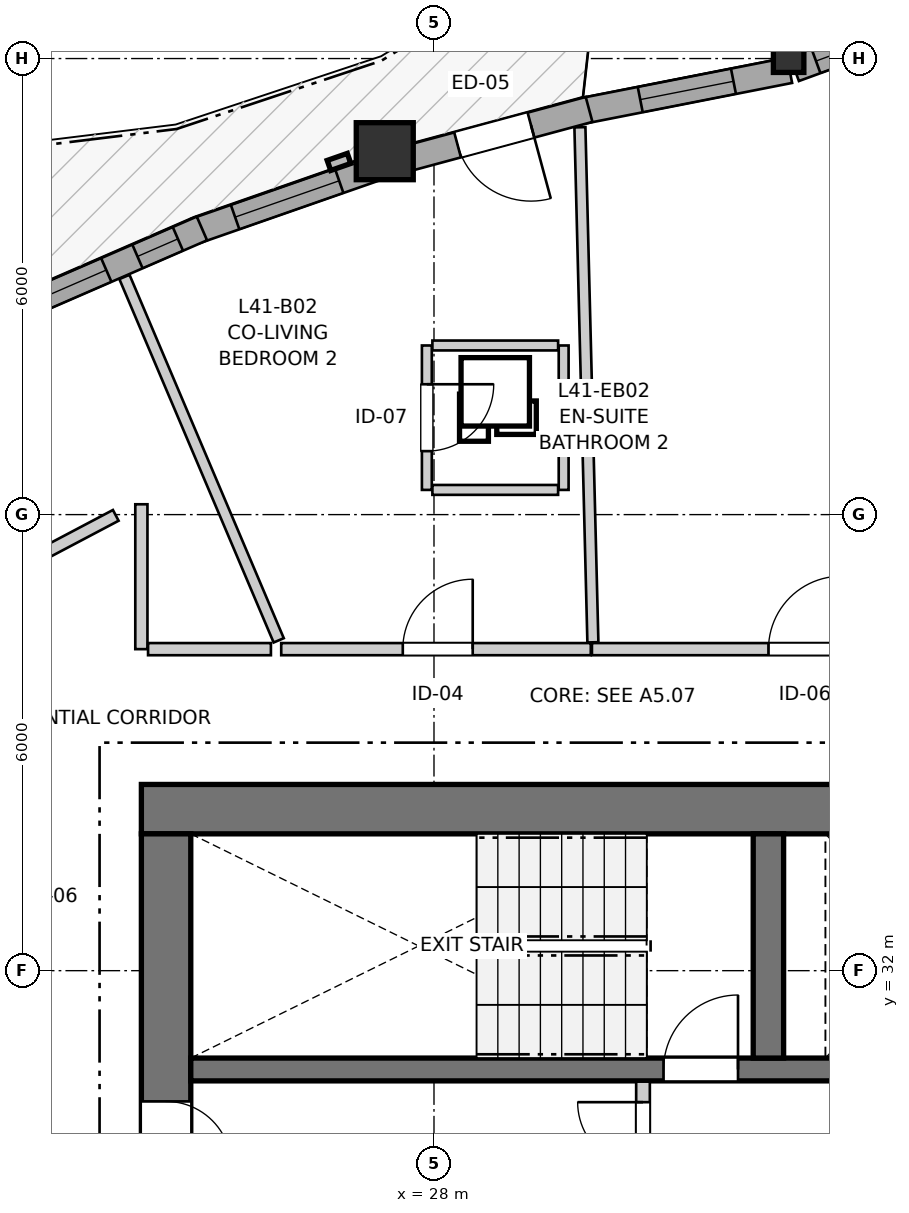
"""IFC4 building model, lengths in metres.
Left out: names, types, materials, properties, quantities, classifications, styles, units other than length and angle.
Written with IfcOpenShell. Run it as: python <this file> out.ifc"""

import sys

from ifc_helpers import new_model, si_unit, direction, frame, frame_2d, origin, origin_2d, place, context, subcontext, project, spatial, rectangle, i_section, extrude, source, transform, mapped, element, fill, save


model = new_model("IFC4")
c1 = context("Model", 3, precision=1e-05, world=origin(), true_north=direction((0.0, 1.0)))
c2 = subcontext(c1, "Body", "Model", "MODEL_VIEW")
j1 = project(units=[si_unit("LENGTHUNIT", "METRE"), si_unit("PLANEANGLEUNIT", "RADIAN")], contexts=[c1])
p1 = place(None, origin())
s1 = spatial("IfcSite", under=j1, at=p1, CompositionType="ELEMENT")
p2 = place(p1, origin())
s2 = spatial("IfcBuilding", under=s1, at=p2, CompositionType="ELEMENT")
p3 = place(p2, frame((0.0, 0.0, 139.4)))
s3 = spatial("IfcBuildingStorey", under=s2, at=p3, CompositionType="ELEMENT", Elevation=139.4)
p4 = place(p3, frame((36.55, 34.125, 0.0), z_axis=(0.0, 0.0, 1.0), x_axis=(-1.0, 0.0, 0.0)))
e1 = element("IfcWall", 1, at=p4, inside=s3, PredefinedType="SHEAR", context=c2, shape_type="SweptSolid", body=[
    extrude(rectangle(XDim=12.4, YDim=0.65, at=frame_2d((6.2, 0.0))), origin(), (0.0, 0.0, 1.0), 2.95),
])
p5 = place(p3, frame((24.475, 33.8, 0.0), z_axis=(0.0, 0.0, 1.0), x_axis=(0.0, -1.0, 0.0)))
e2 = element("IfcWall", 2, at=p5, inside=s3, PredefinedType="SHEAR", context=c2, shape_type="SweptSolid", body=[
    extrude(rectangle(XDim=15.6, YDim=0.65, at=frame_2d((7.8, 0.0))), origin(), (0.0, 0.0, 1.0), 2.95),
])
p6 = place(p5, frame((7.05, 0.0, 0.0)))
e3 = element("IfcOpeningElement", 3, at=p6, cuts=e2, PredefinedType="OPENING", context=c2, shape_type="SweptSolid", body=[
    extrude(rectangle(XDim=1.5, YDim=2.15, at=frame_2d((0.75, 1.075))), frame((0.0, 0.335, 0.0), z_axis=(0.0, -1.0, 0.0), x_axis=(1.0, 0.0, 0.0)), (0.0, 0.0, 1.0), 0.67),
])
p7 = place(p5, frame((3.52, 0.0, 0.0)))
e4 = element("IfcOpeningElement", 4, at=p7, cuts=e2, PredefinedType="OPENING", context=c2, shape_type="SweptSolid", body=[
    extrude(rectangle(XDim=0.86, YDim=2.05, at=frame_2d((0.43, 1.025))), frame((0.0, 0.335, 0.0), z_axis=(0.0, -1.0, 0.0), x_axis=(1.0, 0.0, 0.0)), (0.0, 0.0, 1.0), 0.67),
])
p8 = place(p5, frame((11.22, 0.0, 0.0)))
e5 = element("IfcOpeningElement", 5, at=p8, cuts=e2, PredefinedType="OPENING", context=c2, shape_type="SweptSolid", body=[
    extrude(rectangle(XDim=0.86, YDim=2.05, at=frame_2d((0.43, 1.025))), frame((0.0, 0.335, 0.0), z_axis=(0.0, -1.0, 0.0), x_axis=(1.0, 0.0, 0.0)), (0.0, 0.0, 1.0), 0.67),
])
p9 = place(p3, frame((24.8, 30.7, 0.0), z_axis=(0.0, 0.0, 1.0), x_axis=(1.0, 0.0, 0.0)))
e6 = element("IfcWall", 6, at=p9, inside=s3, PredefinedType="SHEAR", context=c2, shape_type="SweptSolid", body=[
    extrude(rectangle(XDim=11.1, YDim=0.3, at=frame_2d((5.55, 0.0))), origin(), (0.0, 0.0, 1.0), 2.95),
])
p10 = place(p9, frame((6.22, 0.0, 0.0)))
e7 = element("IfcOpeningElement", 7, at=p10, cuts=e6, PredefinedType="OPENING", context=c2, shape_type="SweptSolid", body=[
    extrude(rectangle(XDim=0.98, YDim=2.15, at=frame_2d((0.49, 1.075))), frame((0.0, 0.16, 0.0), z_axis=(0.0, -1.0, 0.0), x_axis=(1.0, 0.0, 0.0)), (0.0, 0.0, 1.0), 0.32),
])
p11 = place(p9, frame((9.15, 0.0, 0.0)))
e8 = element("IfcOpeningElement", 8, at=p11, cuts=e6, PredefinedType="OPENING", context=c2, shape_type="SweptSolid", body=[
    extrude(rectangle(XDim=1.15, YDim=2.15, at=frame_2d((0.575, 1.075))), frame((0.0, 0.16, 0.0), z_axis=(0.0, -1.0, 0.0), x_axis=(1.0, 0.0, 0.0)), (0.0, 0.0, 1.0), 0.32),
])
p12 = place(p3, frame((32.4, 30.85, 0.0), z_axis=(0.0, 0.0, 1.0), x_axis=(0.0, 1.0, 0.0)))
e9 = element("IfcWall", 9, at=p12, inside=s3, PredefinedType="SHEAR", context=c2, shape_type="SweptSolid", body=[
    extrude(rectangle(XDim=2.95, YDim=0.4, at=frame_2d((1.475, 0.0))), origin(), (0.0, 0.0, 1.0), 2.95),
])
m1 = source(origin(), c2, "Body", "SweptSolid", [
    extrude(i_section(OverallWidth=0.401, OverallDepth=0.399, WebThickness=0.023, FlangeThickness=0.036, FilletRadius=0.015, at=origin_2d()), origin(), (0.0, 0.0, 1.0), 2.95),
])
p13 = place(p3, frame((32.666, 44.017, 0.0), z_axis=(0.0, 0.0, 1.0), x_axis=(1.0, 0.0, 0.0)))
e10 = element("IfcColumn", 10, at=p13, inside=s3, PredefinedType="PILASTER", context=c2, shape_type="MappedRepresentation", body=[
    mapped(m1, transform((0.0, 0.0, 0.0), x_axis=(1.0, 0.0, 0.0), y_axis=(0.0, 1.0, 0.0), z_axis=(0.0, 0.0, 1.0), scale=1.0)),
])
m2 = source(origin(), c2, "Body", "SweptSolid", [
    extrude(rectangle(XDim=0.75, YDim=0.75, at=origin_2d()), origin(), (0.0, 0.0, 1.0), 2.95),
])
p14 = place(p3, frame((27.352, 42.781, 0.0), z_axis=(0.0, 0.0, 1.0), x_axis=(1.0, 0.0, 0.0)))
e11 = element("IfcColumn", 11, at=p14, inside=s3, PredefinedType="COLUMN", context=c2, shape_type="MappedRepresentation", body=[
    mapped(m2, transform((0.0, 0.0, 0.0), x_axis=(1.0, 0.0, 0.0), y_axis=(0.0, 1.0, 0.0), z_axis=(0.0, 0.0, 1.0), scale=1.0)),
])
p15 = place(p3, frame((34.644, 44.557, 0.0), z_axis=(0.0, 0.0, 1.0), x_axis=(-0.939440593615, -0.342711790092, 0.0)))
e12 = element("IfcWall", 12, at=p15, inside=s3, PredefinedType="SOLIDWALL", context=c2, shape_type="SweptSolid", body=[
    extrude(rectangle(XDim=2.023, YDim=0.34, at=frame_2d((1.012, 0.0))), origin(), (0.0, 0.0, 1.0), 2.53),
])
p16 = place(p15, frame((0.322, 0.0, 0.82)))
e13 = element("IfcOpeningElement", 13, at=p16, cuts=e12, PredefinedType="OPENING", context=c2, shape_type="SweptSolid", body=[
    extrude(rectangle(XDim=1.4, YDim=1.35, at=frame_2d((0.7, 0.675))), frame((0.0, 0.18, 0.0), z_axis=(0.0, -1.0, 0.0), x_axis=(1.0, 0.0, 0.0)), (0.0, 0.0, 1.0), 0.36),
])
p17 = place(p3, frame((32.679, 43.846, 0.0), z_axis=(0.0, 0.0, 1.0), x_axis=(-0.981247929568, -0.192749839736, 0.0)))
e14 = element("IfcWall", 14, at=p17, inside=s3, PredefinedType="SOLIDWALL", context=c2, shape_type="SweptSolid", body=[
    extrude(rectangle(XDim=2.776, YDim=0.34, at=frame_2d((1.388, 0.0))), origin(), (0.0, 0.0, 1.0), 2.53),
])
p18 = place(p17, frame((0.753, 0.0, 0.82)))
e15 = element("IfcOpeningElement", 15, at=p18, cuts=e14, PredefinedType="OPENING", context=c2, shape_type="SweptSolid", body=[
    extrude(rectangle(XDim=1.25, YDim=1.35, at=frame_2d((0.625, 0.675))), frame((0.0, 0.18, 0.0), z_axis=(0.0, -1.0, 0.0), x_axis=(1.0, 0.0, 0.0)), (0.0, 0.0, 1.0), 0.36),
])
p19 = place(p3, frame((30.04, 43.331, 0.0), z_axis=(0.0, 0.0, 1.0), x_axis=(-0.965460468502, -0.260549580233, 0.0)))
e16 = element("IfcWall", 16, at=p19, inside=s3, PredefinedType="SOLIDWALL", context=c2, shape_type="SweptSolid", body=[
    extrude(rectangle(XDim=2.583, YDim=0.34, at=frame_2d((1.292, 0.0))), origin(), (0.0, 0.0, 1.0), 2.53),
])
p20 = place(p19, frame((0.792, 0.0, 0.0)))
e17 = element("IfcOpeningElement", 17, at=p20, cuts=e16, PredefinedType="OPENING", context=c2, shape_type="SweptSolid", body=[
    extrude(rectangle(XDim=1.0, YDim=2.1, at=frame_2d((0.5, 1.05))), frame((0.0, 0.18, 0.0), z_axis=(0.0, -1.0, 0.0), x_axis=(1.0, 0.0, 0.0)), (0.0, 0.0, 1.0), 0.36),
])
p21 = place(p3, frame((27.262, 42.57, 0.0), z_axis=(0.0, 0.0, 1.0), x_axis=(-0.944148723561, -0.329519631884, 0.0)))
e18 = element("IfcWall", 18, at=p21, inside=s3, PredefinedType="SOLIDWALL", context=c2, shape_type="SweptSolid", body=[
    extrude(rectangle(XDim=2.54, YDim=0.34, at=frame_2d((1.27, 0.0))), origin(), (0.0, 0.0, 1.0), 2.53),
])
p22 = place(p21, frame((0.54, 0.0, 0.82)))
e19 = element("IfcOpeningElement", 19, at=p22, cuts=e18, PredefinedType="OPENING", context=c2, shape_type="SweptSolid", body=[
    extrude(rectangle(XDim=1.45, YDim=1.25, at=frame_2d((0.725, 0.625))), frame((0.0, 0.18, 0.0), z_axis=(0.0, -1.0, 0.0), x_axis=(1.0, 0.0, 0.0)), (0.0, 0.0, 1.0), 0.36),
])
p23 = place(p3, frame((24.947, 41.765, 0.0), z_axis=(0.0, 0.0, 1.0), x_axis=(-0.917074459221, -0.398715984435, 0.0)))
e20 = element("IfcWall", 20, at=p23, inside=s3, PredefinedType="SOLIDWALL", context=c2, shape_type="SweptSolid", body=[
    extrude(rectangle(XDim=2.645, YDim=0.34, at=frame_2d((1.322, 0.0))), origin(), (0.0, 0.0, 1.0), 2.53),
])
p24 = place(p23, frame((0.344, 0.0, 0.82)))
e21 = element("IfcOpeningElement", 21, at=p24, cuts=e20, PredefinedType="OPENING", context=c2, shape_type="SweptSolid", body=[
    extrude(rectangle(XDim=0.58, YDim=1.35, at=frame_2d((0.29, 0.675))), frame((0.0, 0.18, 0.0), z_axis=(0.0, -1.0, 0.0), x_axis=(1.0, 0.0, 0.0)), (0.0, 0.0, 1.0), 0.36),
])
p25 = place(p23, frame((1.372, 0.0, 0.82)))
e22 = element("IfcOpeningElement", 22, at=p25, cuts=e20, PredefinedType="OPENING", context=c2, shape_type="SweptSolid", body=[
    extrude(rectangle(XDim=0.95, YDim=1.35, at=frame_2d((0.475, 0.675))), frame((0.0, 0.18, 0.0), z_axis=(0.0, -1.0, 0.0), x_axis=(1.0, 0.0, 0.0)), (0.0, 0.0, 1.0), 0.36),
])
p26 = place(p3, frame((30.75, 27.43, 0.0), z_axis=(0.0, 0.0, 1.0), x_axis=(0.0, 1.0, 0.0)))
e23 = element("IfcWall", 23, at=p26, inside=s3, PredefinedType="PARTITIONING", context=c2, shape_type="SweptSolid", body=[
    extrude(rectangle(XDim=3.11, YDim=0.18, at=frame_2d((1.555, 0.0))), origin(), (0.0, 0.0, 1.0), 2.95),
])
p27 = place(p26, frame((1.98, 0.0, 0.0)))
e24 = element("IfcOpeningElement", 24, at=p27, cuts=e23, PredefinedType="OPENING", context=c2, shape_type="SweptSolid", body=[
    extrude(rectangle(XDim=0.86, YDim=2.05, at=frame_2d((0.43, 1.025))), frame((0.0, 0.1, 0.0), z_axis=(0.0, -1.0, 0.0), x_axis=(1.0, 0.0, 0.0)), (0.0, 0.0, 1.0), 0.2),
])
p28 = place(p3, frame((30.078, 36.23, 0.0), z_axis=(0.0, 0.0, 1.0), x_axis=(1.0, 0.0, 0.0)))
e25 = element("IfcWall", 25, at=p28, inside=s3, PredefinedType="PARTITIONING", context=c2, shape_type="SweptSolid", body=[
    extrude(rectangle(XDim=5.608, YDim=0.16, at=frame_2d((2.804, 0.0))), origin(), (0.0, 0.0, 1.0), 2.588),
])
p29 = place(p28, frame((2.323, 0.0, 0.0)))
e26 = element("IfcOpeningElement", 26, at=p29, cuts=e25, PredefinedType="OPENING", context=c2, shape_type="SweptSolid", body=[
    extrude(rectangle(XDim=0.96, YDim=2.1, at=frame_2d((0.48, 1.05))), frame((0.0, 0.09, 0.0), z_axis=(0.0, -1.0, 0.0), x_axis=(1.0, 0.0, 0.0)), (0.0, 0.0, 1.0), 0.18),
])
p30 = place(p3, frame((25.99, 36.23, 0.0), z_axis=(0.0, 0.0, 1.0), x_axis=(1.0, 0.0, 0.0)))
e27 = element("IfcWall", 27, at=p30, inside=s3, PredefinedType="PARTITIONING", context=c2, shape_type="SweptSolid", body=[
    extrude(rectangle(XDim=4.073, YDim=0.16, at=frame_2d((2.037, 0.0))), origin(), (0.0, 0.0, 1.0), 2.95),
])
p31 = place(p30, frame((1.6, 0.0, 0.0)))
e28 = element("IfcOpeningElement", 28, at=p31, cuts=e27, PredefinedType="OPENING", context=c2, shape_type="SweptSolid", body=[
    extrude(rectangle(XDim=0.92, YDim=2.1, at=frame_2d((0.46, 1.05))), frame((0.0, 0.09, 0.0), z_axis=(0.0, -1.0, 0.0), x_axis=(1.0, 0.0, 0.0)), (0.0, 0.0, 1.0), 0.18),
])
p32 = place(p3, frame((27.906, 40.225, 0.0), z_axis=(0.0, 0.0, 1.0), x_axis=(0.0, -1.0, 0.0)))
e29 = element("IfcWall", 29, at=p32, inside=s3, PredefinedType="PARTITIONING", context=c2, shape_type="SweptSolid", body=[
    extrude(rectangle(XDim=1.9, YDim=0.13, at=frame_2d((0.95, 0.0))), origin(), (0.0, 0.0, 1.0), 2.318),
])
p33 = place(p32, frame((0.51, 0.0, 0.0)))
e30 = element("IfcOpeningElement", 30, at=p33, cuts=e29, PredefinedType="OPENING", context=c2, shape_type="SweptSolid", body=[
    extrude(rectangle(XDim=0.88, YDim=2.05, at=frame_2d((0.44, 1.025))), frame((0.0, 0.075, 0.0), z_axis=(0.0, -1.0, 0.0), x_axis=(1.0, 0.0, 0.0)), (0.0, 0.0, 1.0), 0.15),
])
p34 = place(p3, frame((29.92, 43.096, 0.0), z_axis=(0.0, 0.0, 1.0), x_axis=(0.025211755772, -0.999682133166, 0.0)))
e31 = element("IfcWall", 31, at=p34, inside=s3, PredefinedType="PARTITIONING", context=c2, shape_type="SweptSolid", body=[
    extrude(rectangle(XDim=6.779, YDim=0.145, at=frame_2d((3.389, 0.0))), origin(), (0.0, 0.0, 1.0), 2.95),
])
p35 = place(p3, frame((23.927, 41.127, 0.0), z_axis=(0.0, 0.0, 1.0), x_axis=(0.39073452171, -0.920503413108, 0.0)))
e32 = element("IfcWall", 32, at=p35, inside=s3, PredefinedType="PARTITIONING", context=c2, shape_type="SweptSolid", body=[
    extrude(rectangle(XDim=5.194, YDim=0.145, at=frame_2d((2.597, 0.0))), origin(), (0.0, 0.0, 1.0), 2.95),
])
p36 = place(p3, frame((24.15, 36.23, 0.0), z_axis=(0.0, 0.0, 1.0), x_axis=(0.0, 1.0, 0.0)))
e33 = element("IfcWall", 33, at=p36, inside=s3, PredefinedType="PARTITIONING", context=c2, shape_type="SweptSolid", body=[
    extrude(rectangle(XDim=1.906, YDim=0.16, at=frame_2d((0.953, 0.0))), origin(), (0.0, 0.0, 1.0), 2.95),
])
p37 = place(p3, frame((29.706, 38.325, 0.0), z_axis=(0.0, 0.0, 1.0), x_axis=(0.0, 1.0, 0.0)))
e34 = element("IfcWall", 34, at=p37, inside=s3, PredefinedType="PARTITIONING", context=c2, shape_type="SweptSolid", body=[
    extrude(rectangle(XDim=1.9, YDim=0.13, at=frame_2d((0.95, 0.0))), origin(), (0.0, 0.0, 1.0), 2.95),
])
p38 = place(p3, frame((24.238, 36.23, 0.0), z_axis=(0.0, 0.0, 1.0), x_axis=(1.0, 0.0, 0.0)))
e35 = element("IfcWall", 35, at=p38, inside=s3, PredefinedType="PARTITIONING", context=c2, shape_type="SweptSolid", body=[
    extrude(rectangle(XDim=1.616, YDim=0.16, at=frame_2d((0.808, 0.0))), origin(), (0.0, 0.0, 1.0), 2.95),
])
p39 = place(p3, frame((27.979, 40.225, 0.0), z_axis=(0.0, 0.0, 1.0), x_axis=(1.0, 0.0, 0.0)))
e36 = element("IfcWall", 36, at=p39, inside=s3, PredefinedType="PARTITIONING", context=c2, shape_type="SweptSolid", body=[
    extrude(rectangle(XDim=1.654, YDim=0.13, at=frame_2d((0.827, 0.0))), origin(), (0.0, 0.0, 1.0), 2.558),
])
p40 = place(p3, frame((27.979, 38.325, 0.0), z_axis=(0.0, 0.0, 1.0), x_axis=(1.0, 0.0, 0.0)))
e37 = element("IfcWall", 37, at=p40, inside=s3, PredefinedType="PARTITIONING", context=c2, shape_type="SweptSolid", body=[
    extrude(rectangle(XDim=1.654, YDim=0.13, at=frame_2d((0.827, 0.0))), origin(), (0.0, 0.0, 1.0), 2.95),
])
p41 = place(p3, frame((22.37, 37.228, 0.0), z_axis=(0.0, 0.0, 1.0), x_axis=(0.884271493782, 0.466973152638, 0.0)))
e38 = element("IfcWall", 38, at=p41, inside=s3, PredefinedType="PARTITIONING", context=c2, shape_type="SweptSolid", body=[
    extrude(rectangle(XDim=1.632, YDim=0.16, at=frame_2d((0.816, 0.0))), origin(), (0.0, 0.0, 1.0), 2.558),
])
m3 = source(origin(), c2, "Body", "SweptSolid", [
    extrude(rectangle(XDim=1.4, YDim=1.35, at=frame_2d((0.7, 0.675))), frame((0.0, 0.03, 0.0), z_axis=(0.0, -1.0, 0.0), x_axis=(1.0, 0.0, 0.0)), (0.0, 0.0, 1.0), 0.06),
])
p42 = place(p16, origin())
e39 = element("IfcWindow", 39, at=p42, inside=s3, PartitioningType="SINGLE_PANEL", PredefinedType="WINDOW", context=c2, shape_type="MappedRepresentation", body=[
    mapped(m3, transform((0.0, 0.0, 0.0), x_axis=(1.0, 0.0, 0.0), y_axis=(0.0, 1.0, 0.0), z_axis=(0.0, 0.0, 1.0), scale=1.0)),
])
fill(e13, e39)
m4 = source(origin(), c2, "Body", "SweptSolid", [
    extrude(rectangle(XDim=1.25, YDim=1.35, at=frame_2d((0.625, 0.675))), frame((0.0, 0.03, 0.0), z_axis=(0.0, -1.0, 0.0), x_axis=(1.0, 0.0, 0.0)), (0.0, 0.0, 1.0), 0.06),
])
p43 = place(p18, origin())
e40 = element("IfcWindow", 40, at=p43, inside=s3, PartitioningType="SINGLE_PANEL", PredefinedType="WINDOW", context=c2, shape_type="MappedRepresentation", body=[
    mapped(m4, transform((0.0, 0.0, 0.0), x_axis=(1.0, 0.0, 0.0), y_axis=(0.0, 1.0, 0.0), z_axis=(0.0, 0.0, 1.0), scale=1.0)),
])
fill(e15, e40)
m5 = source(origin(), c2, "Body", "SweptSolid", [
    extrude(rectangle(XDim=1.45, YDim=1.25, at=frame_2d((0.725, 0.625))), frame((0.0, 0.03, 0.0), z_axis=(0.0, -1.0, 0.0), x_axis=(1.0, 0.0, 0.0)), (0.0, 0.0, 1.0), 0.06),
])
p44 = place(p22, origin())
e41 = element("IfcWindow", 41, at=p44, inside=s3, PartitioningType="SINGLE_PANEL", PredefinedType="WINDOW", context=c2, shape_type="MappedRepresentation", body=[
    mapped(m5, transform((0.0, 0.0, 0.0), x_axis=(1.0, 0.0, 0.0), y_axis=(0.0, 1.0, 0.0), z_axis=(0.0, 0.0, 1.0), scale=1.0)),
])
fill(e19, e41)
m6 = source(origin(), c2, "Body", "SweptSolid", [
    extrude(rectangle(XDim=0.58, YDim=1.35, at=frame_2d((0.29, 0.675))), frame((0.0, 0.03, 0.0), z_axis=(0.0, -1.0, 0.0), x_axis=(1.0, 0.0, 0.0)), (0.0, 0.0, 1.0), 0.06),
])
p45 = place(p24, origin())
e42 = element("IfcWindow", 42, at=p45, inside=s3, PartitioningType="SINGLE_PANEL", PredefinedType="WINDOW", context=c2, shape_type="MappedRepresentation", body=[
    mapped(m6, transform((0.0, 0.0, 0.0), x_axis=(1.0, 0.0, 0.0), y_axis=(0.0, 1.0, 0.0), z_axis=(0.0, 0.0, 1.0), scale=1.0)),
])
fill(e21, e42)
m7 = source(origin(), c2, "Body", "SweptSolid", [
    extrude(rectangle(XDim=0.95, YDim=1.35, at=frame_2d((0.475, 0.675))), frame((0.0, 0.03, 0.0), z_axis=(0.0, -1.0, 0.0), x_axis=(1.0, 0.0, 0.0)), (0.0, 0.0, 1.0), 0.06),
])
p46 = place(p25, origin())
e43 = element("IfcWindow", 43, at=p46, inside=s3, PartitioningType="SINGLE_PANEL", PredefinedType="WINDOW", context=c2, shape_type="MappedRepresentation", body=[
    mapped(m7, transform((0.0, 0.0, 0.0), x_axis=(1.0, 0.0, 0.0), y_axis=(0.0, 1.0, 0.0), z_axis=(0.0, 0.0, 1.0), scale=1.0)),
])
fill(e22, e43)
m8 = source(origin(), c2, "Body", "SweptSolid", [
    extrude(rectangle(XDim=1.0, YDim=2.1, at=frame_2d((0.5, 1.05))), frame((0.0, 0.025, 0.0), z_axis=(0.0, -1.0, 0.0), x_axis=(1.0, 0.0, 0.0)), (0.0, 0.0, 1.0), 0.05),
])
p47 = place(p20, origin())
e44 = element("IfcDoor", 44, at=p47, inside=s3, OperationType="SINGLE_SWING_LEFT", PredefinedType="DOOR", context=c2, shape_type="MappedRepresentation", body=[
    mapped(m8, transform((0.0, 0.0, 0.0), x_axis=(1.0, 0.0, 0.0), y_axis=(0.0, 1.0, 0.0), z_axis=(0.0, 0.0, 1.0), scale=1.0)),
])
fill(e17, e44)
m9 = source(origin(), c2, "Body", "SweptSolid", [
    extrude(rectangle(XDim=0.98, YDim=2.15, at=frame_2d((0.49, 1.075))), frame((0.0, 0.025, 0.0), z_axis=(0.0, -1.0, 0.0), x_axis=(1.0, 0.0, 0.0)), (0.0, 0.0, 1.0), 0.05),
])
p48 = place(p10, origin())
e45 = element("IfcDoor", 45, at=p48, inside=s3, OperationType="SINGLE_SWING_RIGHT", PredefinedType="DOOR", context=c2, shape_type="MappedRepresentation", body=[
    mapped(m9, transform((0.0, 0.0, 0.0), x_axis=(1.0, 0.0, 0.0), y_axis=(0.0, 1.0, 0.0), z_axis=(0.0, 0.0, 1.0), scale=1.0)),
])
fill(e7, e45)
m10 = source(origin(), c2, "Body", "SweptSolid", [
    extrude(rectangle(XDim=0.86, YDim=2.05, at=frame_2d((0.43, 1.025))), frame((0.0, 0.025, 0.0), z_axis=(0.0, -1.0, 0.0), x_axis=(1.0, 0.0, 0.0)), (0.0, 0.0, 1.0), 0.05),
])
p49 = place(p7, origin())
e46 = element("IfcDoor", 46, at=p49, inside=s3, OperationType="SINGLE_SWING_RIGHT", PredefinedType="DOOR", context=c2, shape_type="MappedRepresentation", body=[
    mapped(m10, transform((0.0, 0.0, 0.0), x_axis=(1.0, 0.0, 0.0), y_axis=(0.0, 1.0, 0.0), z_axis=(0.0, 0.0, 1.0), scale=1.0)),
])
fill(e4, e46)
p50 = place(p27, origin())
e47 = element("IfcDoor", 47, at=p50, inside=s3, OperationType="SINGLE_SWING_RIGHT", PredefinedType="DOOR", context=c2, shape_type="MappedRepresentation", body=[
    mapped(m10, transform((0.0, 0.0, 0.0), x_axis=(1.0, 0.0, 0.0), y_axis=(0.0, 1.0, 0.0), z_axis=(0.0, 0.0, 1.0), scale=1.0)),
])
fill(e24, e47)
m11 = source(origin(), c2, "Body", "SweptSolid", [
    extrude(rectangle(XDim=0.96, YDim=2.1, at=frame_2d((0.48, 1.05))), frame((0.0, 0.025, 0.0), z_axis=(0.0, -1.0, 0.0), x_axis=(1.0, 0.0, 0.0)), (0.0, 0.0, 1.0), 0.05),
])
p51 = place(p29, origin())
e48 = element("IfcDoor", 48, at=p51, inside=s3, OperationType="SINGLE_SWING_RIGHT", PredefinedType="DOOR", context=c2, shape_type="MappedRepresentation", body=[
    mapped(m11, transform((0.0, 0.0, 0.0), x_axis=(1.0, 0.0, 0.0), y_axis=(0.0, 1.0, 0.0), z_axis=(0.0, 0.0, 1.0), scale=1.0)),
])
fill(e26, e48)
m12 = source(origin(), c2, "Body", "SweptSolid", [
    extrude(rectangle(XDim=0.92, YDim=2.1, at=frame_2d((0.46, 1.05))), frame((0.0, 0.025, 0.0), z_axis=(0.0, -1.0, 0.0), x_axis=(1.0, 0.0, 0.0)), (0.0, 0.0, 1.0), 0.05),
])
p52 = place(p31, origin())
e49 = element("IfcDoor", 49, at=p52, inside=s3, OperationType="SINGLE_SWING_RIGHT", PredefinedType="DOOR", context=c2, shape_type="MappedRepresentation", body=[
    mapped(m12, transform((0.0, 0.0, 0.0), x_axis=(1.0, 0.0, 0.0), y_axis=(0.0, 1.0, 0.0), z_axis=(0.0, 0.0, 1.0), scale=1.0)),
])
fill(e28, e49)
m13 = source(origin(), c2, "Body", "SweptSolid", [
    extrude(rectangle(XDim=0.88, YDim=2.05, at=frame_2d((0.44, 1.025))), frame((0.0, 0.025, 0.0), z_axis=(0.0, -1.0, 0.0), x_axis=(1.0, 0.0, 0.0)), (0.0, 0.0, 1.0), 0.05),
])
p53 = place(p33, origin())
e50 = element("IfcDoor", 50, at=p53, inside=s3, OperationType="SINGLE_SWING_LEFT", PredefinedType="DOOR", context=c2, shape_type="MappedRepresentation", body=[
    mapped(m13, transform((0.0, 0.0, 0.0), x_axis=(1.0, 0.0, 0.0), y_axis=(0.0, 1.0, 0.0), z_axis=(0.0, 0.0, 1.0), scale=1.0)),
])
fill(e30, e50)
save(model, sys.argv[1])
